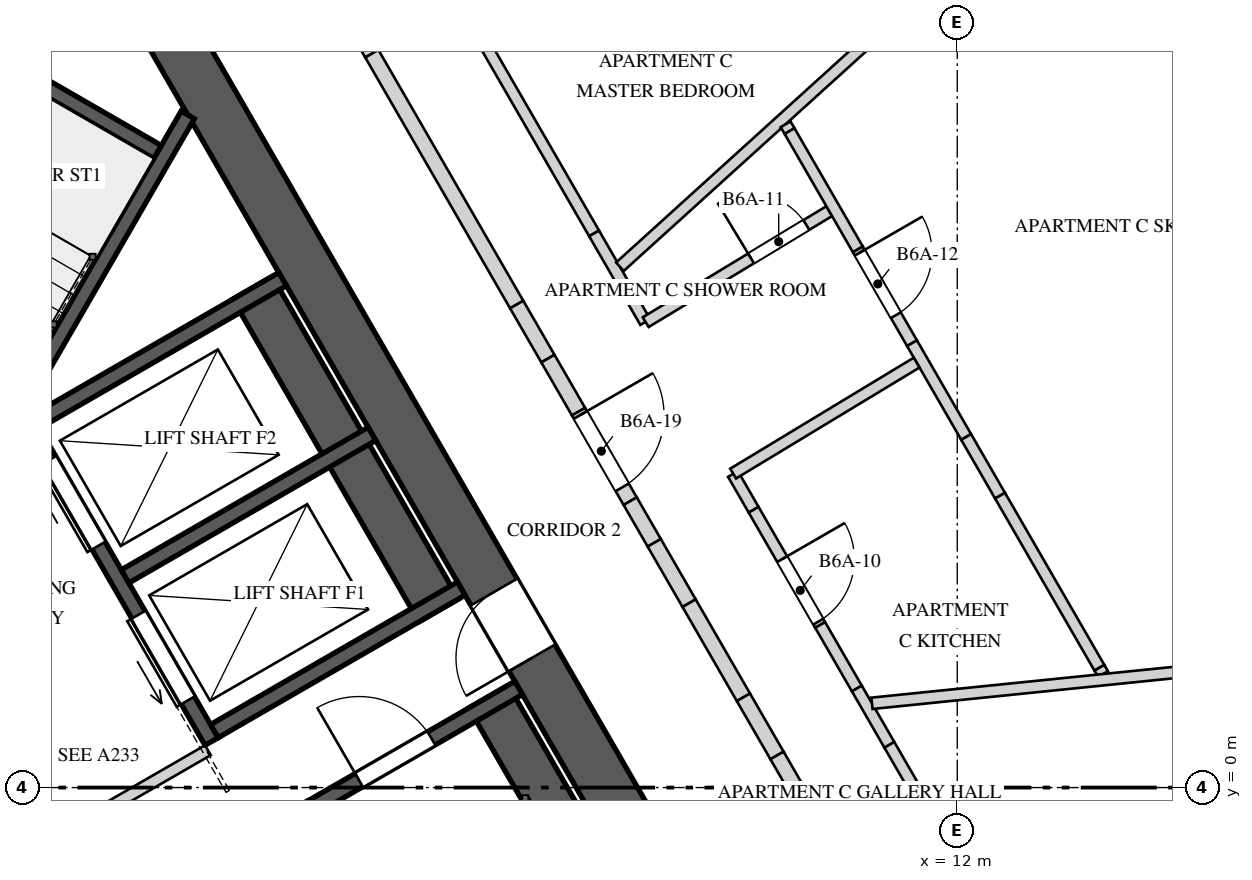
"""IFC4 building model, lengths in metres.
Left out: names, types, materials, properties, quantities, classifications, styles, units other than length and angle.
Written with IfcOpenShell. Run it as: python <this file> out.ifc"""

import sys

from ifc_helpers import new_model, si_unit, direction, frame, frame_2d, origin, place, context, subcontext, project, spatial, polyline, rectangle, outline, extrude, element, fill, save


model = new_model("IFC4")
c1 = context("Model", 3, precision=1e-05, world=origin(), true_north=direction((0.0, 1.0)))
c2 = subcontext(c1, "Body", "Model", "MODEL_VIEW")
j1 = project(units=[si_unit("LENGTHUNIT", "METRE"), si_unit("PLANEANGLEUNIT", "RADIAN")], contexts=[c1])
p1 = place(None, origin())
s1 = spatial("IfcSite", under=j1, at=p1, CompositionType="ELEMENT")
p2 = place(p1, origin())
s2 = spatial("IfcBuilding", under=s1, at=p2, CompositionType="ELEMENT")
p3 = place(p2, frame((0.0, 0.0, 241.2)))
s3 = spatial("IfcBuildingStorey", under=s2, at=p3, CompositionType="ELEMENT", Elevation=241.2)
p4 = place(p3, frame((9.844, -4.25, 0.0), z_axis=(0.0, 0.0, 1.0), x_axis=(-0.500003331888, 0.866023480109, 0.0)))
e1 = element("IfcWall", 1, at=p4, inside=s3, PredefinedType="SHEAR", context=c2, shape_type="SweptSolid", body=[
    extrude(rectangle(XDim=17.205, YDim=0.7, at=frame_2d((8.603, 0.0))), origin(), (0.0, 0.0, 1.0), 4.0),
])
p5 = place(p4, frame((6.877, 0.0, 0.0)))
e2 = element("IfcOpeningElement", 2, at=p5, cuts=e1, PredefinedType="OPENING", context=c2, shape_type="SweptSolid", body=[
    extrude(rectangle(XDim=1.0, YDim=2.4, at=frame_2d((0.5, 1.2))), frame((0.0, 0.36, 0.0), z_axis=(0.0, -1.0, 0.0), x_axis=(1.0, 0.0, 0.0)), (0.0, 0.0, 1.0), 0.72),
])
p6 = place(p3, frame((1.876, 8.85, 0.0), z_axis=(0.0, 0.0, 1.0), x_axis=(-0.499998042495, -0.866026533947, 0.0)))
e3 = element("IfcWall", 3, at=p6, inside=s3, PredefinedType="SOLIDWALL", context=c2, shape_type="SweptSolid", body=[
    extrude(rectangle(XDim=6.723, YDim=0.2, at=frame_2d((3.361, 0.0))), origin(), (0.0, 0.0, 1.0), 3.65),
])
p7 = place(p3, frame((1.479, 8.361, 0.0), z_axis=(0.0, 0.0, 1.0), x_axis=(-0.866035871367, 0.499981869177, 0.0)))
e4 = element("IfcWall", 4, at=p7, inside=s3, PredefinedType="SOLIDWALL", context=c2, shape_type="SweptSolid", body=[
    extrude(rectangle(XDim=3.15, YDim=0.2, at=frame_2d((1.575, 0.0))), origin(), (0.0, 0.0, 1.0), 3.65),
])
p8 = place(p3, frame((8.933, -4.172, 0.0), z_axis=(0.0, 0.0, 1.0), x_axis=(-0.500026960575, 0.86600983753, 0.0)))
e5 = element("IfcWall", 5, at=p8, inside=s3, PredefinedType="SOLIDWALL", context=c2, shape_type="SweptSolid", body=[
    extrude(rectangle(XDim=6.2, YDim=0.6, at=frame_2d((3.1, 0.0))), origin(), (0.0, 0.0, 1.0), 3.65),
])
p9 = place(p3, frame((3.501, -0.265, 0.0), z_axis=(0.0, 0.0, 1.0), x_axis=(0.866035871367, 0.499981869177, 0.0)))
e6 = element("IfcWall", 6, at=p9, inside=s3, PredefinedType="SOLIDWALL", context=c2, shape_type="SweptSolid", body=[
    extrude(rectangle(XDim=3.15, YDim=0.2, at=frame_2d((1.575, 0.0))), origin(), (0.0, 0.0, 1.0), 3.65),
])
p10 = place(p9, frame((0.725, 0.0, 0.0)))
e7 = element("IfcOpeningElement", 7, at=p10, cuts=e6, PredefinedType="OPENING", context=c2, shape_type="SweptSolid", body=[
    extrude(rectangle(XDim=1.1, YDim=2.4, at=frame_2d((0.55, 1.2))), frame((0.0, 0.11, 0.0), z_axis=(0.0, -1.0, 0.0), x_axis=(1.0, 0.0, 0.0)), (0.0, 0.0, 1.0), 0.22),
])
p11 = place(p3, frame((2.19, 0.606, 0.0), z_axis=(0.0, 0.0, 1.0), x_axis=(-0.500002801628, 0.866023786258, 0.0)))
e8 = element("IfcWall", 8, at=p11, inside=s3, PredefinedType="SOLIDWALL", context=c2, shape_type="SweptSolid", body=[
    extrude(rectangle(XDim=4.9, YDim=0.2, at=frame_2d((2.45, 0.0))), origin(), (0.0, 0.0, 1.0), 3.65),
])
p12 = place(p11, frame((0.625, 0.0, 0.0)))
e9 = element("IfcOpeningElement", 9, at=p12, cuts=e8, PredefinedType="OPENING", context=c2, shape_type="SweptSolid", body=[
    extrude(rectangle(XDim=1.3, YDim=2.1, at=frame_2d((0.65, 1.05))), frame((0.0, 0.11, 0.0), z_axis=(0.0, -1.0, 0.0), x_axis=(1.0, 0.0, 0.0)), (0.0, 0.0, 1.0), 0.22),
])
p13 = place(p11, frame((2.975, 0.0, 0.0)))
e10 = element("IfcOpeningElement", 10, at=p13, cuts=e8, PredefinedType="OPENING", context=c2, shape_type="SweptSolid", body=[
    extrude(rectangle(XDim=1.3, YDim=2.1, at=frame_2d((0.65, 1.05))), frame((0.0, 0.11, 0.0), z_axis=(0.0, -1.0, 0.0), x_axis=(1.0, 0.0, 0.0)), (0.0, 0.0, 1.0), 0.22),
])
p14 = place(p3, frame((5.178, 2.331, 0.0), z_axis=(0.0, 0.0, 1.0), x_axis=(-0.49998122708, 0.866036242063, 0.0)))
e11 = element("IfcWall", 11, at=p14, inside=s3, PredefinedType="SOLIDWALL", context=c2, shape_type="SweptSolid", body=[
    extrude(rectangle(XDim=4.9, YDim=0.6, at=frame_2d((2.45, 0.0))), origin(), (0.0, 0.0, 1.0), 3.65),
])
p15 = place(p3, frame((2.227, 0.743, 0.0), z_axis=(0.0, 0.0, 1.0), x_axis=(0.866022959057, 0.500004234368, 0.0)))
e12 = element("IfcWall", 12, at=p15, inside=s3, PredefinedType="SOLIDWALL", context=c2, shape_type="SweptSolid", body=[
    extrude(rectangle(XDim=3.75, YDim=0.2, at=frame_2d((1.875, 0.0))), origin(), (0.0, 0.0, 1.0), 3.65),
])
p16 = place(p3, frame((1.052, 2.778, 0.0), z_axis=(0.0, 0.0, 1.0), x_axis=(0.866039234136, 0.499976044363, 0.0)))
e13 = element("IfcWall", 13, at=p16, inside=s3, PredefinedType="SOLIDWALL", context=c2, shape_type="SweptSolid", body=[
    extrude(rectangle(XDim=3.75, YDim=0.2, at=frame_2d((1.875, 0.0))), origin(), (0.0, 0.0, 1.0), 3.65),
])
p17 = place(p3, frame((-0.123, 4.813, 0.0), z_axis=(0.0, 0.0, 1.0), x_axis=(0.866022959057, 0.500004234368, 0.0)))
e14 = element("IfcWall", 14, at=p17, inside=s3, PredefinedType="SOLIDWALL", context=c2, shape_type="SweptSolid", body=[
    extrude(rectangle(XDim=3.75, YDim=0.2, at=frame_2d((1.875, 0.0))), origin(), (0.0, 0.0, 1.0), 3.65),
])
p18 = place(p3, frame((-0.717, -1.159, 0.0), z_axis=(0.0, 0.0, 1.0), x_axis=(0.866008176907, 0.50002983664, 0.0)))
e15 = element("IfcWall", 15, at=p18, inside=s3, PredefinedType="PARTITIONING", context=c2, shape_type="SweptSolid", body=[
    extrude(rectangle(XDim=3.3, YDim=0.15, at=frame_2d((1.65, 0.0))), origin(), (0.0, 0.0, 1.0), 3.65),
])
p19 = place(p3, frame((4.934, 11.253, 0.0), z_axis=(0.0, 0.0, 1.0), x_axis=(0.500001111708, -0.866024761939, 0.0)))
e16 = element("IfcWall", 16, at=p19, inside=s3, PredefinedType="PARTITIONING", context=c2, shape_type="SweptSolid", body=[
    extrude(rectangle(XDim=4.576, YDim=0.15, at=frame_2d((2.288, 0.0))), origin(), (0.0, 0.0, 1.0), 3.65),
])
p20 = place(p19, frame((0.445, 0.0, 0.0)))
e17 = element("IfcOpeningElement", 17, at=p20, cuts=e16, PredefinedType="OPENING", context=c2, shape_type="SweptSolid", body=[
    extrude(rectangle(XDim=0.95, YDim=2.4, at=frame_2d((0.475, 1.2))), frame((0.0, 0.085, 0.0), z_axis=(0.0, -1.0, 0.0), x_axis=(1.0, 0.0, 0.0)), (0.0, 0.0, 1.0), 0.17),
])
p21 = place(p3, frame((7.222, 7.291, 0.0), z_axis=(0.0, 0.0, 1.0), x_axis=(0.500032254052, -0.866006781098, 0.0)))
e18 = element("IfcWall", 18, at=p21, inside=s3, PredefinedType="PARTITIONING", context=c2, shape_type="SweptSolid", body=[
    extrude(rectangle(XDim=0.796, YDim=0.15, at=frame_2d((0.398, 0.0))), origin(), (0.0, 0.0, 1.0), 2.75),
])
p22 = place(p3, frame((7.62, 6.602, 0.0), z_axis=(0.0, 0.0, 1.0), x_axis=(0.500093091412, -0.865971650761, 0.0)))
e19 = element("IfcWall", 19, at=p22, inside=s3, PredefinedType="PARTITIONING", context=c2, shape_type="SweptSolid", body=[
    extrude(rectangle(XDim=0.551, YDim=0.15, at=frame_2d((0.276, 0.0))), origin(), (0.0, 0.0, 1.0), 3.65),
])
p23 = place(p3, frame((7.562, 6.852, 0.0), z_axis=(0.0, 0.0, 1.0), x_axis=(0.741038665238, 0.671462356817, 0.0)))
e20 = element("IfcWall", 20, at=p23, inside=s3, PredefinedType="PARTITIONING", context=c2, shape_type="SweptSolid", body=[
    extrude(rectangle(XDim=10.057, YDim=0.15, at=frame_2d((5.028, 0.0))), origin(), (0.0, 0.0, 1.0), 2.75),
])
p24 = place(p3, frame((7.901, 6.123, 0.0), z_axis=(0.0, 0.0, 1.0), x_axis=(0.855708816302, 0.517457652087, 0.0)))
e21 = element("IfcWall", 21, at=p24, inside=s3, PredefinedType="PARTITIONING", context=c2, shape_type="SweptSolid", body=[
    extrude(rectangle(XDim=2.822, YDim=0.15, at=frame_2d((1.411, 0.0))), origin(), (0.0, 0.0, 1.0), 3.65),
])
p25 = place(p24, frame((1.62, 0.0, 0.0)))
e22 = element("IfcOpeningElement", 22, at=p25, cuts=e21, PredefinedType="OPENING", context=c2, shape_type="SweptSolid", body=[
    extrude(rectangle(XDim=0.85, YDim=2.4, at=frame_2d((0.425, 1.2))), frame((0.0, 0.085, 0.0), z_axis=(0.0, -1.0, 0.0), x_axis=(1.0, 0.0, 0.0)), (0.0, 0.0, 1.0), 0.17),
])
p26 = place(p3, frame((9.05, 4.125, 0.0), z_axis=(0.0, 0.0, 1.0), x_axis=(0.500007885066, -0.866020851292, 0.0)))
e23 = element("IfcWall", 23, at=p26, inside=s3, PredefinedType="PARTITIONING", context=c2, shape_type="SweptSolid", body=[
    extrude(rectangle(XDim=0.543, YDim=0.15, at=frame_2d((0.271, 0.0))), origin(), (0.0, 0.0, 1.0), 3.65),
])
p27 = place(p3, frame((9.321, 3.655, 0.0), z_axis=(0.0, 0.0, 1.0), x_axis=(0.499980071345, -0.866036909293, 0.0)))
e24 = element("IfcWall", 24, at=p27, inside=s3, PredefinedType="PARTITIONING", context=c2, shape_type="SweptSolid", body=[
    extrude(outline(polyline([(0.0, 0.0), (1.75, 0.0), (1.75, 3.65), (0.892, 3.65), (0.892, 2.55), (0.0, 2.55), (0.0, 0.0)])), frame((0.0, 0.075, 0.0), z_axis=(0.0, -1.0, 0.0), x_axis=(1.0, 0.0, 0.0)), (0.0, 0.0, 1.0), 0.15),
])
p28 = place(p27, frame((0.75, 0.0, 0.0)))
e25 = element("IfcOpeningElement", 25, at=p28, cuts=e24, PredefinedType="OPENING", context=c2, shape_type="SweptSolid", body=[
    extrude(rectangle(XDim=0.95, YDim=2.4, at=frame_2d((0.475, 1.2))), frame((0.0, 0.085, 0.0), z_axis=(0.0, -1.0, 0.0), x_axis=(1.0, 0.0, 0.0)), (0.0, 0.0, 1.0), 0.17),
])
p29 = place(p3, frame((10.196, 2.139, 0.0), z_axis=(0.0, 0.0, 1.0), x_axis=(0.500109093648, -0.865962409375, 0.0)))
e26 = element("IfcWall", 26, at=p29, inside=s3, PredefinedType="PARTITIONING", context=c2, shape_type="SweptSolid", body=[
    extrude(rectangle(XDim=0.966, YDim=0.15, at=frame_2d((0.483, 0.0))), origin(), (0.0, 0.0, 1.0), 3.65),
])
p30 = place(p3, frame((10.679, 1.303, 0.0), z_axis=(0.0, 0.0, 1.0), x_axis=(0.500035209441, -0.86600507465, 0.0)))
e27 = element("IfcWall", 27, at=p30, inside=s3, PredefinedType="PARTITIONING", context=c2, shape_type="SweptSolid", body=[
    extrude(rectangle(XDim=0.856, YDim=0.15, at=frame_2d((0.428, 0.0))), origin(), (0.0, 0.0, 1.0), 2.75),
])
p31 = place(p3, frame((11.107, 0.562, 0.0), z_axis=(0.0, 0.0, 1.0), x_axis=(0.499981090573, -0.866036320872, 0.0)))
e28 = element("IfcWall", 28, at=p31, inside=s3, PredefinedType="PARTITIONING", context=c2, shape_type="SweptSolid", body=[
    extrude(rectangle(XDim=5.556, YDim=0.15, at=frame_2d((2.778, 0.0))), origin(), (0.0, 0.0, 1.0), 3.65),
])
p32 = place(p31, frame((1.971, 0.0, 0.0)))
e29 = element("IfcOpeningElement", 29, at=p32, cuts=e28, PredefinedType="OPENING", context=c2, shape_type="SweptSolid", body=[
    extrude(rectangle(XDim=0.95, YDim=2.4, at=frame_2d((0.475, 1.2))), frame((0.0, 0.085, 0.0), z_axis=(0.0, -1.0, 0.0), x_axis=(1.0, 0.0, 0.0)), (0.0, 0.0, 1.0), 0.17),
])
p33 = place(p3, frame((9.742, 8.726, 0.0), z_axis=(0.0, 0.0, 1.0), x_axis=(0.500943559977, -0.865479953388, 0.0)))
e30 = element("IfcWall", 30, at=p33, inside=s3, PredefinedType="PARTITIONING", context=c2, shape_type="SweptSolid", body=[
    extrude(rectangle(XDim=0.104, YDim=0.15, at=frame_2d((0.052, 0.0))), origin(), (0.0, 0.0, 1.0), 2.75),
])
p34 = place(p3, frame((9.794, 8.636, 0.0), z_axis=(0.0, 0.0, 1.0), x_axis=(0.499953802258, -0.86605207442, 0.0)))
e31 = element("IfcWall", 31, at=p34, inside=s3, PredefinedType="PARTITIONING", context=c2, shape_type="SweptSolid", body=[
    extrude(rectangle(XDim=1.797, YDim=0.15, at=frame_2d((0.898, 0.0))), origin(), (0.0, 0.0, 1.0), 3.65),
])
p35 = place(p3, frame((10.692, 7.081, 0.0), z_axis=(0.0, 0.0, 1.0), x_axis=(0.499969479948, -0.866043023828, 0.0)))
e32 = element("IfcWall", 32, at=p35, inside=s3, PredefinedType="PARTITIONING", context=c2, shape_type="SweptSolid", body=[
    extrude(outline(polyline([(0.0, 0.0), (1.426, 0.0), (1.426, 2.55), (0.551, 2.55), (0.551, 3.65), (0.0, 3.65), (0.0, 0.0)])), frame((0.0, 0.075, 0.0), z_axis=(0.0, -1.0, 0.0), x_axis=(1.0, 0.0, 0.0)), (0.0, 0.0, 1.0), 0.15),
])
p36 = place(p35, frame((0.05, 0.0, 0.0)))
e33 = element("IfcOpeningElement", 33, at=p36, cuts=e32, PredefinedType="OPENING", context=c2, shape_type="SweptSolid", body=[
    extrude(rectangle(XDim=0.95, YDim=2.4, at=frame_2d((0.475, 1.2))), frame((0.0, 0.085, 0.0), z_axis=(0.0, -1.0, 0.0), x_axis=(1.0, 0.0, 0.0)), (0.0, 0.0, 1.0), 0.17),
])
p37 = place(p3, frame((11.405, 5.846, 0.0), z_axis=(0.0, 0.0, 1.0), x_axis=(0.500103350459, -0.865965726146, 0.0)))
e34 = element("IfcWall", 34, at=p37, inside=s3, PredefinedType="PARTITIONING", context=c2, shape_type="SweptSolid", body=[
    extrude(rectangle(XDim=1.424, YDim=0.15, at=frame_2d((0.712, 0.0))), origin(), (0.0, 0.0, 1.0), 3.65),
])
p38 = place(p3, frame((12.117, 4.613, 0.0), z_axis=(0.0, 0.0, 1.0), x_axis=(0.499967368674, -0.86604424267, 0.0)))
e35 = element("IfcWall", 35, at=p38, inside=s3, PredefinedType="PARTITIONING", context=c2, shape_type="SweptSolid", body=[
    extrude(rectangle(XDim=0.892, YDim=0.15, at=frame_2d((0.446, 0.0))), origin(), (0.0, 0.0, 1.0), 2.55),
])
p39 = place(p3, frame((12.563, 3.84, 0.0), z_axis=(0.0, 0.0, 1.0), x_axis=(0.500016176693, -0.866016063965, 0.0)))
e36 = element("IfcWall", 36, at=p39, inside=s3, PredefinedType="PARTITIONING", context=c2, shape_type="SweptSolid", body=[
    extrude(rectangle(XDim=2.614, YDim=0.15, at=frame_2d((1.307, 0.0))), origin(), (0.0, 0.0, 1.0), 3.65),
])
p40 = place(p3, frame((13.87, 1.576, 0.0), z_axis=(0.0, 0.0, 1.0), x_axis=(0.49972245349, -0.866185586049, 0.0)))
e37 = element("IfcWall", 37, at=p40, inside=s3, PredefinedType="PARTITIONING", context=c2, shape_type="SweptSolid", body=[
    extrude(rectangle(XDim=0.095, YDim=0.15, at=frame_2d((0.048, 0.0))), origin(), (0.0, 0.0, 1.0), 2.75),
])
p41 = place(p3, frame((11.466, 5.591, 0.0), z_axis=(0.0, 0.0, 1.0), x_axis=(-0.855670500176, -0.517521009359, 0.0)))
e38 = element("IfcWall", 38, at=p41, inside=s3, PredefinedType="PARTITIONING", context=c2, shape_type="SweptSolid", body=[
    extrude(rectangle(XDim=2.822, YDim=0.15, at=frame_2d((1.411, 0.0))), origin(), (0.0, 0.0, 1.0), 3.65),
])
p42 = place(p3, frame((20.157, 2.054, 0.0), z_axis=(0.0, 0.0, 1.0), x_axis=(-0.994848051669, -0.101377285871, 0.0)))
e39 = element("IfcWall", 39, at=p42, inside=s3, PredefinedType="PARTITIONING", context=c2, shape_type="SweptSolid", body=[
    extrude(rectangle(XDim=9.327, YDim=0.15, at=frame_2d((4.664, 0.0))), origin(), (0.0, 0.0, 1.0), 2.75),
])
p43 = place(p3, frame((3.855, 10.423, 0.0), z_axis=(0.0, 0.0, 1.0), x_axis=(0.500135429527, -0.86594719939, 0.0)))
e40 = element("IfcWall", 40, at=p43, inside=s3, PredefinedType="SOLIDWALL", context=c2, shape_type="SweptSolid", body=[
    extrude(rectangle(XDim=0.887, YDim=0.2, at=frame_2d((0.443, 0.0))), origin(), (0.0, 0.0, 1.0), 2.95),
])
p44 = place(p3, frame((4.299, 9.655, 0.0), z_axis=(0.0, 0.0, 1.0), x_axis=(0.499997905474, -0.866026613056, 0.0)))
e41 = element("IfcWall", 41, at=p44, inside=s3, PredefinedType="SOLIDWALL", context=c2, shape_type="SweptSolid", body=[
    extrude(rectangle(XDim=3.811, YDim=0.2, at=frame_2d((1.905, 0.0))), origin(), (0.0, 0.0, 1.0), 3.65),
])
p45 = place(p3, frame((6.204, 6.355, 0.0), z_axis=(0.0, 0.0, 1.0), x_axis=(0.499911126926, -0.866076708598, 0.0)))
e42 = element("IfcWall", 42, at=p45, inside=s3, PredefinedType="SOLIDWALL", context=c2, shape_type="SweptSolid", body=[
    extrude(rectangle(XDim=0.822, YDim=0.2, at=frame_2d((0.411, 0.0))), origin(), (0.0, 0.0, 1.0), 2.75),
])
p46 = place(p3, frame((6.615, 5.643, 0.0), z_axis=(0.0, 0.0, 1.0), x_axis=(0.499984757355, -0.866034203951, 0.0)))
e43 = element("IfcWall", 43, at=p46, inside=s3, PredefinedType="SOLIDWALL", context=c2, shape_type="SweptSolid", body=[
    extrude(rectangle(XDim=0.806, YDim=0.2, at=frame_2d((0.403, 0.0))), origin(), (0.0, 0.0, 1.0), 3.65),
])
p47 = place(p3, frame((7.017, 4.946, 0.0), z_axis=(0.0, 0.0, 1.0), x_axis=(0.499924531544, -0.866068971134, 0.0)))
e44 = element("IfcWall", 44, at=p47, inside=s3, PredefinedType="SOLIDWALL", context=c2, shape_type="SweptSolid", body=[
    extrude(outline(polyline([(0.0, 0.0), (1.36, 0.0), (1.359, 2.55), (0.459, 2.55), (0.459, 3.65), (0.0, 3.65), (0.0, 0.0)])), frame((0.0, 0.1, 0.0), z_axis=(0.0, -1.0, 0.0), x_axis=(1.0, 0.0, 0.0)), (0.0, 0.0, 1.0), 0.2),
])
p48 = place(p47, frame((0.05, 0.0, 0.0)))
e45 = element("IfcOpeningElement", 45, at=p48, cuts=e44, PredefinedType="OPENING", context=c2, shape_type="SweptSolid", body=[
    extrude(rectangle(XDim=1.1, YDim=2.4, at=frame_2d((0.55, 1.2))), frame((0.0, 0.11, 0.0), z_axis=(0.0, -1.0, 0.0), x_axis=(1.0, 0.0, 0.0)), (0.0, 0.0, 1.0), 0.22),
])
p49 = place(p3, frame((7.697, 3.768, 0.0), z_axis=(0.0, 0.0, 1.0), x_axis=(0.50012328804, -0.865954211699, 0.0)))
e46 = element("IfcWall", 46, at=p49, inside=s3, PredefinedType="SOLIDWALL", context=c2, shape_type="SweptSolid", body=[
    extrude(rectangle(XDim=0.633, YDim=0.2, at=frame_2d((0.316, 0.0))), origin(), (0.0, 0.0, 1.0), 3.65),
])
p50 = place(p3, frame((8.013, 3.22, 0.0), z_axis=(0.0, 0.0, 1.0), x_axis=(0.500175591747, -0.865924002104, 0.0)))
e47 = element("IfcWall", 47, at=p50, inside=s3, PredefinedType="SOLIDWALL", context=c2, shape_type="SweptSolid", body=[
    extrude(rectangle(XDim=0.917, YDim=0.2, at=frame_2d((0.458, 0.0))), origin(), (0.0, 0.0, 1.0), 2.55),
])
p51 = place(p3, frame((8.472, 2.426, 0.0), z_axis=(0.0, 0.0, 1.0), x_axis=(0.499904796234, -0.866080362727, 0.0)))
e48 = element("IfcWall", 48, at=p51, inside=s3, PredefinedType="SOLIDWALL", context=c2, shape_type="SweptSolid", body=[
    extrude(rectangle(XDim=1.429, YDim=0.2, at=frame_2d((0.715, 0.0))), origin(), (0.0, 0.0, 1.0), 3.65),
])
p52 = place(p3, frame((9.187, 1.188, 0.0), z_axis=(0.0, 0.0, 1.0), x_axis=(0.500121072013, -0.86595549154, 0.0)))
e49 = element("IfcWall", 49, at=p52, inside=s3, PredefinedType="SOLIDWALL", context=c2, shape_type="SweptSolid", body=[
    extrude(rectangle(XDim=0.884, YDim=0.2, at=frame_2d((0.442, 0.0))), origin(), (0.0, 0.0, 1.0), 2.75),
])
p53 = place(p3, frame((9.629, 0.423, 0.0), z_axis=(0.0, 0.0, 1.0), x_axis=(0.499995433041, -0.866028040503, 0.0)))
e50 = element("IfcWall", 50, at=p53, inside=s3, PredefinedType="SOLIDWALL", context=c2, shape_type="SweptSolid", body=[
    extrude(rectangle(XDim=5.161, YDim=0.2, at=frame_2d((2.581, 0.0))), origin(), (0.0, 0.0, 1.0), 3.65),
])
p54 = place(p10, origin())
e51 = element("IfcDoor", 51, at=p54, inside=s3, OperationType="SINGLE_SWING_RIGHT", PredefinedType="DOOR", context=c2, shape_type="SweptSolid", body=[
    extrude(rectangle(XDim=1.1, YDim=2.4, at=frame_2d((0.55, 1.2))), frame((0.0, 0.025, 0.0), z_axis=(0.0, -1.0, 0.0), x_axis=(1.0, 0.0, 0.0)), (0.0, 0.0, 1.0), 0.05),
])
fill(e7, e51)
p55 = place(p12, origin())
e52 = element("IfcDoor", 52, at=p55, inside=s3, OperationType="SLIDING_TO_LEFT", PredefinedType="DOOR", context=c2, shape_type="SweptSolid", body=[
    extrude(rectangle(XDim=1.3, YDim=2.1, at=frame_2d((0.65, 1.05))), frame((0.0, 0.025, 0.0), z_axis=(0.0, -1.0, 0.0), x_axis=(1.0, 0.0, 0.0)), (0.0, 0.0, 1.0), 0.05),
])
fill(e9, e52)
p56 = place(p13, origin())
e53 = element("IfcDoor", 53, at=p56, inside=s3, OperationType="SLIDING_TO_RIGHT", PredefinedType="DOOR", context=c2, shape_type="SweptSolid", body=[
    extrude(rectangle(XDim=1.3, YDim=2.1, at=frame_2d((0.65, 1.05))), frame((0.0, 0.025, 0.0), z_axis=(0.0, -1.0, 0.0), x_axis=(1.0, 0.0, 0.0)), (0.0, 0.0, 1.0), 0.05),
])
fill(e10, e53)
p57 = place(p5, origin())
e54 = element("IfcDoor", 54, at=p57, inside=s3, OperationType="SINGLE_SWING_RIGHT", PredefinedType="DOOR", context=c2, shape_type="SweptSolid", body=[
    extrude(rectangle(XDim=1.0, YDim=2.4, at=frame_2d((0.5, 1.2))), frame((0.0, 0.025, 0.0), z_axis=(0.0, -1.0, 0.0), x_axis=(1.0, 0.0, 0.0)), (0.0, 0.0, 1.0), 0.05),
])
fill(e2, e54)
p58 = place(p28, origin())
e55 = element("IfcDoor", 55, at=p58, inside=s3, OperationType="SINGLE_SWING_RIGHT", PredefinedType="DOOR", context=c2, shape_type="SweptSolid", body=[
    extrude(rectangle(XDim=0.95, YDim=2.4, at=frame_2d((0.475, 1.2))), frame((0.0, 0.025, 0.0), z_axis=(0.0, -1.0, 0.0), x_axis=(1.0, 0.0, 0.0)), (0.0, 0.0, 1.0), 0.05),
])
fill(e25, e55)
p59 = place(p25, origin())
e56 = element("IfcDoor", 56, at=p59, inside=s3, OperationType="SINGLE_SWING_LEFT", PredefinedType="DOOR", context=c2, shape_type="SweptSolid", body=[
    extrude(rectangle(XDim=0.85, YDim=2.4, at=frame_2d((0.425, 1.2))), frame((0.0, 0.025, 0.0), z_axis=(0.0, -1.0, 0.0), x_axis=(1.0, 0.0, 0.0)), (0.0, 0.0, 1.0), 0.05),
])
fill(e22, e56)
p60 = place(p36, origin())
e57 = element("IfcDoor", 57, at=p60, inside=s3, OperationType="SINGLE_SWING_RIGHT", PredefinedType="DOOR", context=c2, shape_type="SweptSolid", body=[
    extrude(rectangle(XDim=0.95, YDim=2.4, at=frame_2d((0.475, 1.2))), frame((0.0, 0.025, 0.0), z_axis=(0.0, -1.0, 0.0), x_axis=(1.0, 0.0, 0.0)), (0.0, 0.0, 1.0), 0.05),
])
fill(e33, e57)
p61 = place(p48, origin())
e58 = element("IfcDoor", 58, at=p61, inside=s3, OperationType="SINGLE_SWING_LEFT", PredefinedType="DOOR", context=c2, shape_type="SweptSolid", body=[
    extrude(rectangle(XDim=1.1, YDim=2.4, at=frame_2d((0.55, 1.2))), frame((0.0, 0.025, 0.0), z_axis=(0.0, -1.0, 0.0), x_axis=(1.0, 0.0, 0.0)), (0.0, 0.0, 1.0), 0.05),
])
fill(e45, e58)
save(model, sys.argv[1])
